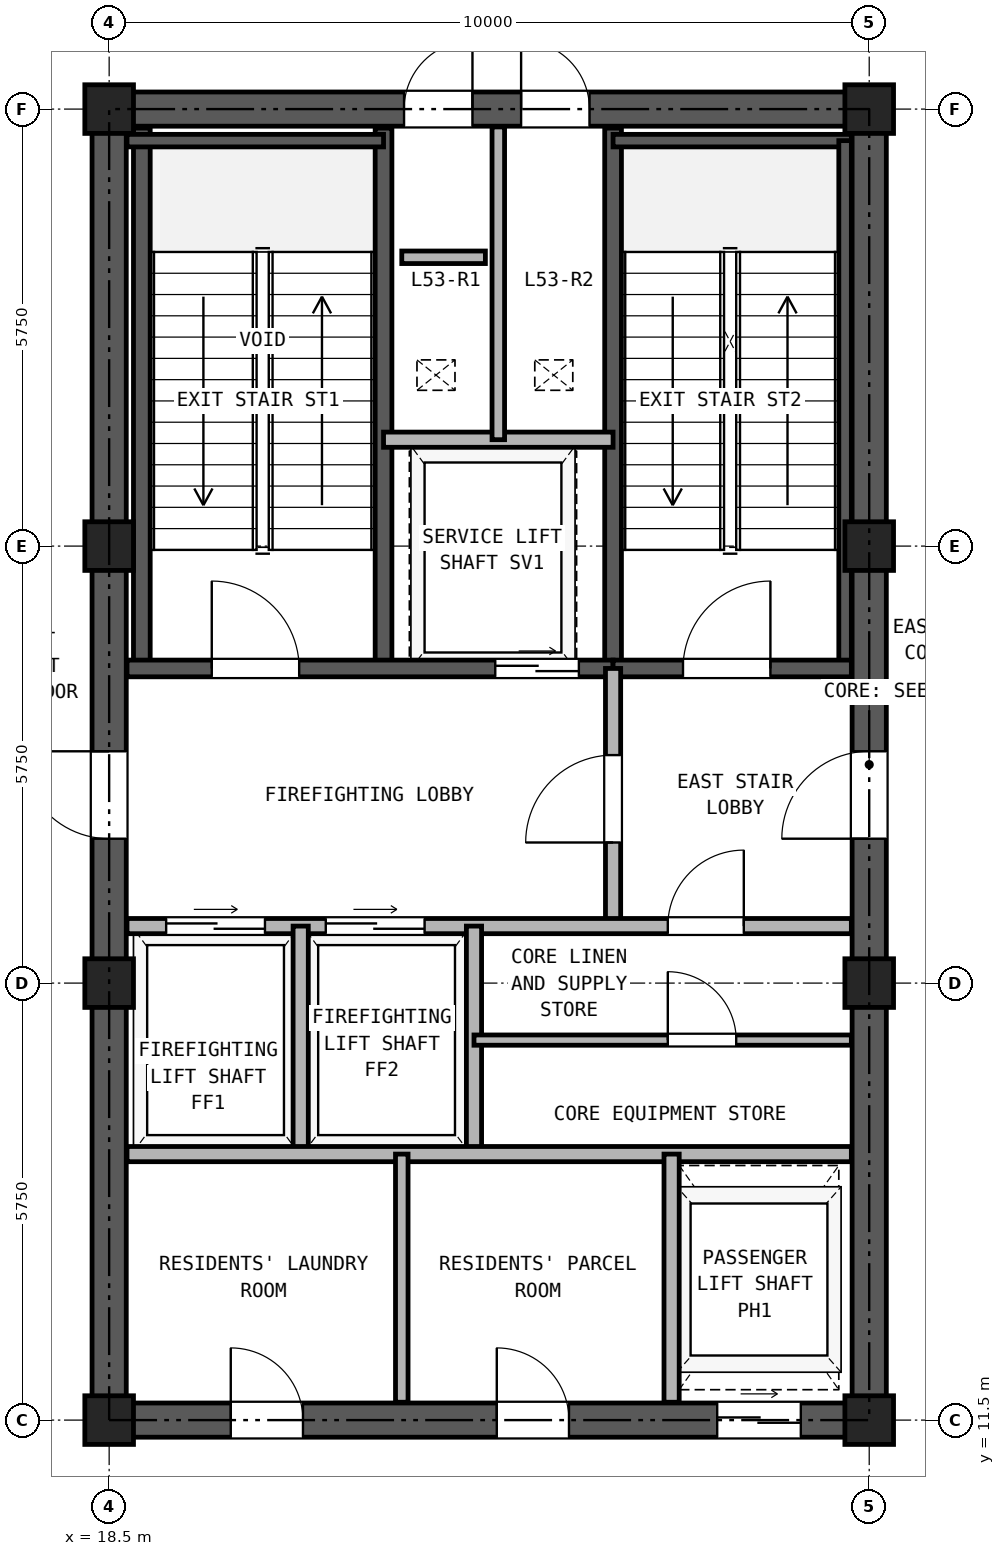
"""IFC4 building model, lengths in metres.
Left out: names, types, materials, properties, quantities, classifications, styles, units other than length and angle.
Written with IfcOpenShell. Run it as: python <this file> out.ifc"""

import sys

from ifc_helpers import new_model, si_unit, direction, frame, frame_2d, origin, origin_2d, place, context, subcontext, project, spatial, rectangle, hollow_rectangle, extrude, source, transform, mapped, element, fill, save


model = new_model("IFC4")
c1 = context("Model", 3, precision=1e-05, world=origin(), true_north=direction((0.0, 1.0)))
c2 = subcontext(c1, "Body", "Model", "MODEL_VIEW")
j1 = project(units=[si_unit("LENGTHUNIT", "METRE"), si_unit("PLANEANGLEUNIT", "RADIAN")], contexts=[c1])
p1 = place(None, origin())
s1 = spatial("IfcSite", under=j1, at=p1, CompositionType="ELEMENT")
p2 = place(p1, origin())
s2 = spatial("IfcBuilding", under=s1, at=p2, CompositionType="ELEMENT")
p3 = place(p2, frame((0.0, 0.0, 188.1)))
s3 = spatial("IfcBuildingStorey", under=s2, at=p3, CompositionType="ELEMENT", Elevation=188.1)
m1 = source(origin(), c2, "Body", "SweptSolid", [
    extrude(hollow_rectangle(XDim=0.64, YDim=0.64, WallThickness=0.035, at=origin_2d()), origin(), (0.0, 0.0, 1.0), 4.85),
])
for number, where, z_axis, x_axis in (
    (1, (18.5, 11.5, 0.0), (0.0, 0.0, 1.0), (1.0, 0.0, 0.0)),
    (2, (18.5, 17.25, 0.0), (0.0, 0.0, 1.0), (1.0, 0.0, 0.0)),
    (3, (18.5, 23.0, 0.0), (0.0, 0.0, 1.0), (1.0, 0.0, 0.0)),
    (4, (18.5, 28.75, 0.0), (0.0, 0.0, 1.0), (1.0, 0.0, 0.0)),
    (5, (28.5, 11.5, 0.0), (0.0, 0.0, 1.0), (1.0, 0.0, 0.0)),
    (6, (28.5, 17.25, 0.0), (0.0, 0.0, 1.0), (1.0, 0.0, 0.0)),
    (7, (28.5, 23.0, 0.0), (0.0, 0.0, 1.0), (1.0, 0.0, 0.0)),
    (8, (28.5, 28.75, 0.0), (0.0, 0.0, 1.0), (1.0, 0.0, 0.0)),
):
    element("IfcColumn", number, at=place(p3, frame(where, z_axis=z_axis, x_axis=x_axis)), inside=s3, PredefinedType="COLUMN", context=c2, shape_type="MappedRepresentation", body=[
        mapped(m1, transform((0.0, 0.0, 0.0), x_axis=(1.0, 0.0, 0.0), y_axis=(0.0, 1.0, 0.0), z_axis=(0.0, 0.0, 1.0), scale=1.0)),
    ])
p4 = place(p3, frame((18.275, 11.5, 0.0), z_axis=(0.0, 0.0, 1.0), x_axis=(1.0, 0.0, 0.0)))
e9 = element("IfcWall", 9, at=p4, inside=s3, PredefinedType="SHEAR", context=c2, shape_type="SweptSolid", body=[
    extrude(rectangle(XDim=10.45, YDim=0.45, at=frame_2d((5.225, 0.0))), origin(), (0.0, 0.0, 1.0), 4.85),
])
p5 = place(p4, frame((1.825, 0.0, 0.0)))
e10 = element("IfcOpeningElement", 10, at=p5, cuts=e9, PredefinedType="OPENING", context=c2, shape_type="SweptSolid", body=[
    extrude(rectangle(XDim=0.95, YDim=2.15, at=frame_2d((0.475, 1.075))), frame((0.0, 0.235, 0.0), z_axis=(0.0, -1.0, 0.0), x_axis=(1.0, 0.0, 0.0)), (0.0, 0.0, 1.0), 0.47),
])
p6 = place(p4, frame((5.325, 0.0, 0.0)))
e11 = element("IfcOpeningElement", 11, at=p6, cuts=e9, PredefinedType="OPENING", context=c2, shape_type="SweptSolid", body=[
    extrude(rectangle(XDim=0.95, YDim=2.15, at=frame_2d((0.475, 1.075))), frame((0.0, 0.235, 0.0), z_axis=(0.0, -1.0, 0.0), x_axis=(1.0, 0.0, 0.0)), (0.0, 0.0, 1.0), 0.47),
])
p7 = place(p4, frame((8.225, 0.0, 0.0)))
e12 = element("IfcOpeningElement", 12, at=p7, cuts=e9, PredefinedType="OPENING", context=c2, shape_type="SweptSolid", body=[
    extrude(rectangle(XDim=1.1, YDim=2.25, at=frame_2d((0.55, 1.125))), frame((0.0, 0.235, 0.0), z_axis=(0.0, -1.0, 0.0), x_axis=(1.0, 0.0, 0.0)), (0.0, 0.0, 1.0), 0.47),
])
p8 = place(p3, frame((18.275, 28.75, 0.0), z_axis=(0.0, 0.0, 1.0), x_axis=(1.0, 0.0, 0.0)))
e13 = element("IfcWall", 13, at=p8, inside=s3, PredefinedType="SHEAR", context=c2, shape_type="SweptSolid", body=[
    extrude(rectangle(XDim=10.45, YDim=0.45, at=frame_2d((5.225, 0.0))), origin(), (0.0, 0.0, 1.0), 4.85),
])
p9 = place(p8, frame((4.105, 0.0, 0.0)))
e14 = element("IfcOpeningElement", 14, at=p9, cuts=e13, PredefinedType="OPENING", context=c2, shape_type="SweptSolid", body=[
    extrude(rectangle(XDim=0.9, YDim=2.05, at=frame_2d((0.45, 1.025))), frame((0.0, 0.235, 0.0), z_axis=(0.0, -1.0, 0.0), x_axis=(1.0, 0.0, 0.0)), (0.0, 0.0, 1.0), 0.47),
])
p10 = place(p8, frame((5.645, 0.0, 0.0)))
e15 = element("IfcOpeningElement", 15, at=p10, cuts=e13, PredefinedType="OPENING", context=c2, shape_type="SweptSolid", body=[
    extrude(rectangle(XDim=0.9, YDim=2.05, at=frame_2d((0.45, 1.025))), frame((0.0, 0.235, 0.0), z_axis=(0.0, -1.0, 0.0), x_axis=(1.0, 0.0, 0.0)), (0.0, 0.0, 1.0), 0.47),
])
p11 = place(p3, frame((18.5, 11.725, 0.0), z_axis=(0.0, 0.0, 1.0), x_axis=(0.0, 1.0, 0.0)))
e16 = element("IfcWall", 16, at=p11, inside=s3, PredefinedType="SHEAR", context=c2, shape_type="SweptSolid", body=[
    extrude(rectangle(XDim=16.8, YDim=0.45, at=frame_2d((8.4, 0.0))), origin(), (0.0, 0.0, 1.0), 4.85),
])
p12 = place(p11, frame((7.425, 0.0, 0.0)))
e17 = element("IfcOpeningElement", 17, at=p12, cuts=e16, PredefinedType="OPENING", context=c2, shape_type="SweptSolid", body=[
    extrude(rectangle(XDim=1.15, YDim=2.2, at=frame_2d((0.575, 1.1))), frame((0.0, 0.235, 0.0), z_axis=(0.0, -1.0, 0.0), x_axis=(1.0, 0.0, 0.0)), (0.0, 0.0, 1.0), 0.47),
])
p13 = place(p3, frame((28.5, 11.725, 0.0), z_axis=(0.0, 0.0, 1.0), x_axis=(0.0, 1.0, 0.0)))
e18 = element("IfcWall", 18, at=p13, inside=s3, PredefinedType="SHEAR", context=c2, shape_type="SweptSolid", body=[
    extrude(rectangle(XDim=16.8, YDim=0.45, at=frame_2d((8.4, 0.0))), origin(), (0.0, 0.0, 1.0), 4.85),
])
p14 = place(p13, frame((7.425, 0.0, 0.0)))
e19 = element("IfcOpeningElement", 19, at=p14, cuts=e18, PredefinedType="OPENING", context=c2, shape_type="SweptSolid", body=[
    extrude(rectangle(XDim=1.15, YDim=2.2, at=frame_2d((0.575, 1.1))), frame((0.0, 0.235, 0.0), z_axis=(0.0, -1.0, 0.0), x_axis=(1.0, 0.0, 0.0)), (0.0, 0.0, 1.0), 0.47),
])
for number, where, z_axis, x_axis in (
    (20, (18.93, 21.39, 0.0), (0.0, 0.0, 1.0), (0.0, 1.0, 0.0)),
    (21, (22.11, 21.39, 0.0), (0.0, 0.0, 1.0), (0.0, 1.0, 0.0)),
    (22, (25.13, 21.39, 0.0), (0.0, 0.0, 1.0), (0.0, 1.0, 0.0)),
):
    element("IfcWall", number, at=place(p3, frame(where, z_axis=z_axis, x_axis=x_axis)), inside=s3, PredefinedType="SOLIDWALL", context=c2, shape_type="SweptSolid", body=[
        extrude(rectangle(XDim=7.11, YDim=0.22, at=frame_2d((3.555, 0.0))), origin(), (0.0, 0.0, 1.0), 4.85),
    ])
p15 = place(p3, frame((18.735, 28.335, 0.0), z_axis=(0.0, 0.0, 1.0), x_axis=(1.0, 0.0, 0.0)))
e23 = element("IfcWall", 23, at=p15, inside=s3, PredefinedType="PARTITIONING", context=c2, shape_type="SweptSolid", body=[
    extrude(rectangle(XDim=3.375, YDim=0.165, at=frame_2d((1.688, 0.0))), origin(), (0.0, 0.0, 1.0), 4.85),
])
p16 = place(p3, frame((25.13, 28.335, 0.0), z_axis=(0.0, 0.0, 1.0), x_axis=(1.0, 0.0, 0.0)))
e24 = element("IfcWall", 24, at=p16, inside=s3, PredefinedType="PARTITIONING", context=c2, shape_type="SweptSolid", body=[
    extrude(rectangle(XDim=3.135, YDim=0.165, at=frame_2d((1.567, 0.0))), origin(), (0.0, 0.0, 1.0), 4.85),
])
p17 = place(p3, frame((28.183, 21.39, 0.0), z_axis=(0.0, 0.0, 1.0), x_axis=(0.0, 1.0, 0.0)))
e25 = element("IfcWall", 25, at=p17, inside=s3, PredefinedType="PARTITIONING", context=c2, shape_type="SweptSolid", body=[
    extrude(rectangle(XDim=6.945, YDim=0.165, at=frame_2d((3.473, 0.0))), origin(), (0.0, 0.0, 1.0), 4.85),
])
p18 = place(p3, frame((18.735, 21.39, 0.0), z_axis=(0.0, 0.0, 1.0), x_axis=(1.0, 0.0, 0.0)))
e26 = element("IfcWall", 26, at=p18, inside=s3, PredefinedType="SOLIDWALL", context=c2, shape_type="SweptSolid", body=[
    extrude(rectangle(XDim=6.395, YDim=0.22, at=frame_2d((3.197, 0.0))), origin(), (0.0, 0.0, 1.0), 4.85),
])
p19 = place(p18, frame((1.115, 0.0, 0.0)))
e27 = element("IfcOpeningElement", 27, at=p19, cuts=e26, PredefinedType="OPENING", context=c2, shape_type="SweptSolid", body=[
    extrude(rectangle(XDim=1.15, YDim=2.2, at=frame_2d((0.575, 1.1))), frame((0.0, 0.12, 0.0), z_axis=(0.0, -1.0, 0.0), x_axis=(1.0, 0.0, 0.0)), (0.0, 0.0, 1.0), 0.24),
])
p20 = place(p18, frame((4.845, 0.0, 0.0)))
e28 = element("IfcOpeningElement", 28, at=p20, cuts=e26, PredefinedType="OPENING", context=c2, shape_type="SweptSolid", body=[
    extrude(rectangle(XDim=1.1, YDim=2.25, at=frame_2d((0.55, 1.125))), frame((0.0, 0.12, 0.0), z_axis=(0.0, -1.0, 0.0), x_axis=(1.0, 0.0, 0.0)), (0.0, 0.0, 1.0), 0.24),
])
p21 = place(p3, frame((25.13, 21.39, 0.0), z_axis=(0.0, 0.0, 1.0), x_axis=(1.0, 0.0, 0.0)))
e29 = element("IfcWall", 29, at=p21, inside=s3, PredefinedType="SOLIDWALL", context=c2, shape_type="SweptSolid", body=[
    extrude(rectangle(XDim=3.135, YDim=0.22, at=frame_2d((1.567, 0.0))), origin(), (0.0, 0.0, 1.0), 4.85),
])
p22 = place(p21, frame((0.92, 0.0, 0.0)))
e30 = element("IfcOpeningElement", 30, at=p22, cuts=e29, PredefinedType="OPENING", context=c2, shape_type="SweptSolid", body=[
    extrude(rectangle(XDim=1.15, YDim=2.2, at=frame_2d((0.575, 1.1))), frame((0.0, 0.12, 0.0), z_axis=(0.0, -1.0, 0.0), x_axis=(1.0, 0.0, 0.0)), (0.0, 0.0, 1.0), 0.24),
])
p23 = place(p3, frame((22.11, 24.4, 0.0), z_axis=(0.0, 0.0, 1.0), x_axis=(1.0, 0.0, 0.0)))
e31 = element("IfcWall", 31, at=p23, inside=s3, PredefinedType="PARTITIONING", context=c2, shape_type="SweptSolid", body=[
    extrude(rectangle(XDim=3.02, YDim=0.2, at=frame_2d((1.51, 0.0))), origin(), (0.0, 0.0, 1.0), 4.85),
])
p24 = place(p3, frame((23.62, 24.4, 0.0), z_axis=(0.0, 0.0, 1.0), x_axis=(0.0, 1.0, 0.0)))
e32 = element("IfcWall", 32, at=p24, inside=s3, PredefinedType="PARTITIONING", context=c2, shape_type="SweptSolid", body=[
    extrude(rectangle(XDim=4.115, YDim=0.165, at=frame_2d((2.058, 0.0))), origin(), (0.0, 0.0, 1.0), 4.85),
])
p25 = place(p3, frame((25.13, 18.0, 0.0), z_axis=(0.0, 0.0, 1.0), x_axis=(0.0, 1.0, 0.0)))
e33 = element("IfcWall", 33, at=p25, inside=s3, PredefinedType="PARTITIONING", context=c2, shape_type="SweptSolid", body=[
    extrude(rectangle(XDim=3.39, YDim=0.2, at=frame_2d((1.695, 0.0))), origin(), (0.0, 0.0, 1.0), 4.85),
])
p26 = place(p25, frame((1.1, 0.0, 0.0)))
e34 = element("IfcOpeningElement", 34, at=p26, cuts=e33, PredefinedType="OPENING", context=c2, shape_type="SweptSolid", body=[
    extrude(rectangle(XDim=1.15, YDim=2.2, at=frame_2d((0.575, 1.1))), frame((0.0, 0.11, 0.0), z_axis=(0.0, -1.0, 0.0), x_axis=(1.0, 0.0, 0.0)), (0.0, 0.0, 1.0), 0.22),
])
p27 = place(p3, frame((18.735, 18.0, 0.0), z_axis=(0.0, 0.0, 1.0), x_axis=(1.0, 0.0, 0.0)))
e35 = element("IfcWall", 35, at=p27, inside=s3, PredefinedType="PARTITIONING", context=c2, shape_type="SweptSolid", body=[
    extrude(rectangle(XDim=9.53, YDim=0.2, at=frame_2d((4.765, 0.0))), origin(), (0.0, 0.0, 1.0), 4.85),
])
p28 = place(p27, frame((0.515, 0.0, 0.0)))
e36 = element("IfcOpeningElement", 36, at=p28, cuts=e35, PredefinedType="OPENING", context=c2, shape_type="SweptSolid", body=[
    extrude(rectangle(XDim=1.3, YDim=2.3, at=frame_2d((0.65, 1.15))), frame((0.0, 0.11, 0.0), z_axis=(0.0, -1.0, 0.0), x_axis=(1.0, 0.0, 0.0)), (0.0, 0.0, 1.0), 0.22),
])
p29 = place(p27, frame((2.615, 0.0, 0.0)))
e37 = element("IfcOpeningElement", 37, at=p29, cuts=e35, PredefinedType="OPENING", context=c2, shape_type="SweptSolid", body=[
    extrude(rectangle(XDim=1.3, YDim=2.3, at=frame_2d((0.65, 1.15))), frame((0.0, 0.11, 0.0), z_axis=(0.0, -1.0, 0.0), x_axis=(1.0, 0.0, 0.0)), (0.0, 0.0, 1.0), 0.22),
])
p30 = place(p27, frame((7.115, 0.0, 0.0)))
e38 = element("IfcOpeningElement", 38, at=p30, cuts=e35, PredefinedType="OPENING", context=c2, shape_type="SweptSolid", body=[
    extrude(rectangle(XDim=1.0, YDim=2.15, at=frame_2d((0.5, 1.075))), frame((0.0, 0.11, 0.0), z_axis=(0.0, -1.0, 0.0), x_axis=(1.0, 0.0, 0.0)), (0.0, 0.0, 1.0), 0.22),
])
for number, where, z_axis, x_axis in (
    (39, (21.02, 15.0, 0.0), (0.0, 0.0, 1.0), (0.0, 1.0, 0.0)),
    (40, (23.3, 15.0, 0.0), (0.0, 0.0, 1.0), (0.0, 1.0, 0.0)),
):
    element("IfcWall", number, at=place(p3, frame(where, z_axis=z_axis, x_axis=x_axis)), inside=s3, PredefinedType="PARTITIONING", context=c2, shape_type="SweptSolid", body=[
        extrude(rectangle(XDim=3.0, YDim=0.2, at=frame_2d((1.5, 0.0))), origin(), (0.0, 0.0, 1.0), 4.85),
    ])
p31 = place(p3, frame((18.735, 15.0, 0.0), z_axis=(0.0, 0.0, 1.0), x_axis=(1.0, 0.0, 0.0)))
e41 = element("IfcWall", 41, at=p31, inside=s3, PredefinedType="PARTITIONING", context=c2, shape_type="SweptSolid", body=[
    extrude(rectangle(XDim=9.53, YDim=0.2, at=frame_2d((4.765, 0.0))), origin(), (0.0, 0.0, 1.0), 4.85),
])
p32 = place(p3, frame((23.3, 16.5, 0.0), z_axis=(0.0, 0.0, 1.0), x_axis=(1.0, 0.0, 0.0)))
e42 = element("IfcWall", 42, at=p32, inside=s3, PredefinedType="PARTITIONING", context=c2, shape_type="SweptSolid", body=[
    extrude(rectangle(XDim=4.965, YDim=0.135, at=frame_2d((2.482, 0.0))), origin(), (0.0, 0.0, 1.0), 4.85),
])
p33 = place(p32, frame((2.55, 0.0, 0.0)))
e43 = element("IfcOpeningElement", 43, at=p33, cuts=e42, PredefinedType="OPENING", context=c2, shape_type="SweptSolid", body=[
    extrude(rectangle(XDim=0.9, YDim=2.05, at=frame_2d((0.45, 1.025))), frame((0.0, 0.077, 0.0), z_axis=(0.0, -1.0, 0.0), x_axis=(1.0, 0.0, 0.0)), (0.0, 0.0, 1.0), 0.155),
])
p34 = place(p3, frame((22.35, 11.735, 0.0), z_axis=(0.0, 0.0, 1.0), x_axis=(0.0, 1.0, 0.0)))
e44 = element("IfcWall", 44, at=p34, inside=s3, PredefinedType="PARTITIONING", context=c2, shape_type="SweptSolid", body=[
    extrude(rectangle(XDim=3.265, YDim=0.165, at=frame_2d((1.632, 0.0))), origin(), (0.0, 0.0, 1.0), 4.85),
])
p35 = place(p3, frame((25.9, 11.735, 0.0), z_axis=(0.0, 0.0, 1.0), x_axis=(0.0, 1.0, 0.0)))
e45 = element("IfcWall", 45, at=p35, inside=s3, PredefinedType="PARTITIONING", context=c2, shape_type="SweptSolid", body=[
    extrude(rectangle(XDim=3.265, YDim=0.2, at=frame_2d((1.632, 0.0))), origin(), (0.0, 0.0, 1.0), 4.85),
])
p36 = place(p3, frame((22.35, 26.8, 0.0), z_axis=(0.0, 0.0, 1.0), x_axis=(1.0, 0.0, 0.0)))
e46 = element("IfcWall", 46, at=p36, inside=s3, PredefinedType="PARTITIONING", context=c2, shape_type="SweptSolid", body=[
    extrude(rectangle(XDim=1.1, YDim=0.165, at=frame_2d((0.55, 0.0))), origin(), (0.0, 0.0, 1.0), 4.85),
])
p37 = place(p19, frame((1.15, 0.0, 0.0), z_axis=(0.0, 0.0, 1.0), x_axis=(-1.0, 0.0, 0.0)))
e47 = element("IfcDoor", 47, at=p37, inside=s3, OperationType="SINGLE_SWING_LEFT", PredefinedType="DOOR", context=c2, shape_type="SweptSolid", body=[
    extrude(rectangle(XDim=1.15, YDim=2.2, at=frame_2d((0.575, 1.1))), frame((0.0, 0.025, 0.0), z_axis=(0.0, -1.0, 0.0), x_axis=(1.0, 0.0, 0.0)), (0.0, 0.0, 1.0), 0.05),
])
fill(e27, e47)
p38 = place(p22, frame((1.15, 0.0, 0.0), z_axis=(0.0, 0.0, 1.0), x_axis=(-1.0, 0.0, 0.0)))
e48 = element("IfcDoor", 48, at=p38, inside=s3, OperationType="SINGLE_SWING_RIGHT", PredefinedType="DOOR", context=c2, shape_type="SweptSolid", body=[
    extrude(rectangle(XDim=1.15, YDim=2.2, at=frame_2d((0.575, 1.1))), frame((0.0, 0.025, 0.0), z_axis=(0.0, -1.0, 0.0), x_axis=(1.0, 0.0, 0.0)), (0.0, 0.0, 1.0), 0.05),
])
fill(e30, e48)
p39 = place(p20, frame((1.1, 0.0, 0.0), z_axis=(0.0, 0.0, 1.0), x_axis=(-1.0, 0.0, 0.0)))
e49 = element("IfcDoor", 49, at=p39, inside=s3, OperationType="DOUBLE_DOOR_SLIDING", PredefinedType="DOOR", context=c2, shape_type="SweptSolid", body=[
    extrude(rectangle(XDim=1.1, YDim=2.25, at=frame_2d((0.55, 1.125))), frame((0.0, 0.025, 0.0), z_axis=(0.0, -1.0, 0.0), x_axis=(1.0, 0.0, 0.0)), (0.0, 0.0, 1.0), 0.05),
])
fill(e28, e49)
p40 = place(p26, origin())
e50 = element("IfcDoor", 50, at=p40, inside=s3, OperationType="SINGLE_SWING_LEFT", PredefinedType="DOOR", context=c2, shape_type="SweptSolid", body=[
    extrude(rectangle(XDim=1.15, YDim=2.2, at=frame_2d((0.575, 1.1))), frame((0.0, 0.025, 0.0), z_axis=(0.0, -1.0, 0.0), x_axis=(1.0, 0.0, 0.0)), (0.0, 0.0, 1.0), 0.05),
])
fill(e34, e50)
p41 = place(p28, origin())
e51 = element("IfcDoor", 51, at=p41, inside=s3, OperationType="DOUBLE_DOOR_SLIDING", PredefinedType="DOOR", context=c2, shape_type="SweptSolid", body=[
    extrude(rectangle(XDim=1.3, YDim=2.3, at=frame_2d((0.65, 1.15))), frame((0.0, 0.025, 0.0), z_axis=(0.0, -1.0, 0.0), x_axis=(1.0, 0.0, 0.0)), (0.0, 0.0, 1.0), 0.05),
])
fill(e36, e51)
p42 = place(p29, origin())
e52 = element("IfcDoor", 52, at=p42, inside=s3, OperationType="DOUBLE_DOOR_SLIDING", PredefinedType="DOOR", context=c2, shape_type="SweptSolid", body=[
    extrude(rectangle(XDim=1.3, YDim=2.3, at=frame_2d((0.65, 1.15))), frame((0.0, 0.025, 0.0), z_axis=(0.0, -1.0, 0.0), x_axis=(1.0, 0.0, 0.0)), (0.0, 0.0, 1.0), 0.05),
])
fill(e37, e52)
p43 = place(p30, frame((1.0, 0.0, 0.0), z_axis=(0.0, 0.0, 1.0), x_axis=(-1.0, 0.0, 0.0)))
e53 = element("IfcDoor", 53, at=p43, inside=s3, OperationType="SINGLE_SWING_RIGHT", PredefinedType="DOOR", context=c2, shape_type="SweptSolid", body=[
    extrude(rectangle(XDim=1.0, YDim=2.15, at=frame_2d((0.5, 1.075))), frame((0.0, 0.025, 0.0), z_axis=(0.0, -1.0, 0.0), x_axis=(1.0, 0.0, 0.0)), (0.0, 0.0, 1.0), 0.05),
])
fill(e38, e53)
p44 = place(p33, frame((0.9, 0.0, 0.0), z_axis=(0.0, 0.0, 1.0), x_axis=(-1.0, 0.0, 0.0)))
e54 = element("IfcDoor", 54, at=p44, inside=s3, OperationType="SINGLE_SWING_LEFT", PredefinedType="DOOR", context=c2, shape_type="SweptSolid", body=[
    extrude(rectangle(XDim=0.9, YDim=2.05, at=frame_2d((0.45, 1.025))), frame((0.0, 0.025, 0.0), z_axis=(0.0, -1.0, 0.0), x_axis=(1.0, 0.0, 0.0)), (0.0, 0.0, 1.0), 0.05),
])
fill(e43, e54)
p45 = place(p12, frame((1.15, 0.0, 0.0), z_axis=(0.0, 0.0, 1.0), x_axis=(-1.0, 0.0, 0.0)))
e55 = element("IfcDoor", 55, at=p45, inside=s3, OperationType="SINGLE_SWING_RIGHT", PredefinedType="DOOR", context=c2, shape_type="SweptSolid", body=[
    extrude(rectangle(XDim=1.15, YDim=2.2, at=frame_2d((0.575, 1.1))), frame((0.0, 0.025, 0.0), z_axis=(0.0, -1.0, 0.0), x_axis=(1.0, 0.0, 0.0)), (0.0, 0.0, 1.0), 0.05),
])
fill(e17, e55)
p46 = place(p14, origin())
e56 = element("IfcDoor", 56, at=p46, inside=s3, OperationType="SINGLE_SWING_LEFT", PredefinedType="DOOR", context=c2, shape_type="SweptSolid", body=[
    extrude(rectangle(XDim=1.15, YDim=2.2, at=frame_2d((0.575, 1.1))), frame((0.0, 0.025, 0.0), z_axis=(0.0, -1.0, 0.0), x_axis=(1.0, 0.0, 0.0)), (0.0, 0.0, 1.0), 0.05),
])
fill(e19, e56)
p47 = place(p9, origin())
e57 = element("IfcDoor", 57, at=p47, inside=s3, OperationType="SINGLE_SWING_RIGHT", PredefinedType="DOOR", context=c2, shape_type="SweptSolid", body=[
    extrude(rectangle(XDim=0.9, YDim=2.05, at=frame_2d((0.45, 1.025))), frame((0.0, 0.025, 0.0), z_axis=(0.0, -1.0, 0.0), x_axis=(1.0, 0.0, 0.0)), (0.0, 0.0, 1.0), 0.05),
])
fill(e14, e57)
p48 = place(p10, origin())
e58 = element("IfcDoor", 58, at=p48, inside=s3, OperationType="SINGLE_SWING_LEFT", PredefinedType="DOOR", context=c2, shape_type="SweptSolid", body=[
    extrude(rectangle(XDim=0.9, YDim=2.05, at=frame_2d((0.45, 1.025))), frame((0.0, 0.025, 0.0), z_axis=(0.0, -1.0, 0.0), x_axis=(1.0, 0.0, 0.0)), (0.0, 0.0, 1.0), 0.05),
])
fill(e15, e58)
p49 = place(p5, frame((0.95, 0.0, 0.0), z_axis=(0.0, 0.0, 1.0), x_axis=(-1.0, 0.0, 0.0)))
e59 = element("IfcDoor", 59, at=p49, inside=s3, OperationType="SINGLE_SWING_LEFT", PredefinedType="DOOR", context=c2, shape_type="SweptSolid", body=[
    extrude(rectangle(XDim=0.95, YDim=2.15, at=frame_2d((0.475, 1.075))), frame((0.0, 0.025, 0.0), z_axis=(0.0, -1.0, 0.0), x_axis=(1.0, 0.0, 0.0)), (0.0, 0.0, 1.0), 0.05),
])
fill(e10, e59)
p50 = place(p6, frame((0.95, 0.0, 0.0), z_axis=(0.0, 0.0, 1.0), x_axis=(-1.0, 0.0, 0.0)))
e60 = element("IfcDoor", 60, at=p50, inside=s3, OperationType="SINGLE_SWING_LEFT", PredefinedType="DOOR", context=c2, shape_type="SweptSolid", body=[
    extrude(rectangle(XDim=0.95, YDim=2.15, at=frame_2d((0.475, 1.075))), frame((0.0, 0.025, 0.0), z_axis=(0.0, -1.0, 0.0), x_axis=(1.0, 0.0, 0.0)), (0.0, 0.0, 1.0), 0.05),
])
fill(e11, e60)
p51 = place(p7, frame((1.1, 0.0, 0.0), z_axis=(0.0, 0.0, 1.0), x_axis=(-1.0, 0.0, 0.0)))
e61 = element("IfcDoor", 61, at=p51, inside=s3, OperationType="DOUBLE_DOOR_SLIDING", PredefinedType="DOOR", context=c2, shape_type="SweptSolid", body=[
    extrude(rectangle(XDim=1.1, YDim=2.25, at=frame_2d((0.55, 1.125))), frame((0.0, 0.025, 0.0), z_axis=(0.0, -1.0, 0.0), x_axis=(1.0, 0.0, 0.0)), (0.0, 0.0, 1.0), 0.05),
])
fill(e12, e61)
save(model, sys.argv[1])
